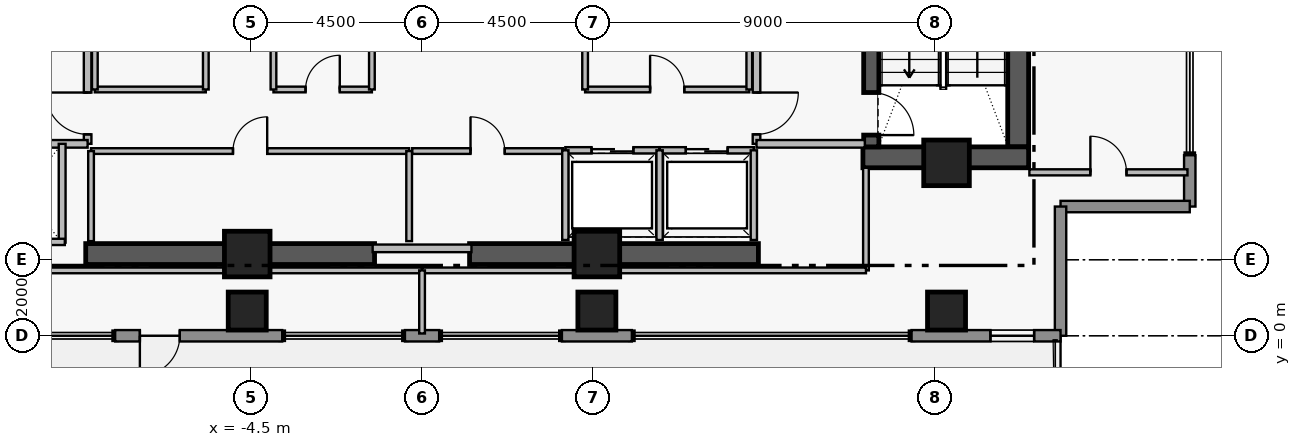
"""IFC4 building model, lengths in metres.
Left out: names, types, materials, properties, quantities, classifications, styles, units other than length and angle.
Written with IfcOpenShell. Run it as: python <this file> out.ifc"""

import sys

from ifc_helpers import new_model, si_unit, direction, frame, frame_2d, origin, origin_2d, place, context, subcontext, project, spatial, rectangle, extrude, element, fill, save


model = new_model("IFC4")
c1 = context("Model", 3, precision=1e-05, world=origin(), true_north=direction((0.0, 1.0)))
c2 = subcontext(c1, "Body", "Model", "MODEL_VIEW")
j1 = project(units=[si_unit("LENGTHUNIT", "METRE"), si_unit("PLANEANGLEUNIT", "RADIAN")], contexts=[c1])
p1 = place(None, origin())
s1 = spatial("IfcSite", under=j1, at=p1, CompositionType="ELEMENT")
p2 = place(p1, origin())
s2 = spatial("IfcBuilding", under=s1, at=p2, CompositionType="ELEMENT")
p3 = place(p2, frame((0.0, 0.0, 272.95)))
s3 = spatial("IfcBuildingStorey", under=s2, at=p3, CompositionType="ELEMENT", Elevation=272.95)
p4 = place(p3, frame((15.685, 4.97, 0.0), z_axis=(0.0, 0.0, 1.0), x_axis=(0.0, 1.0, 0.0)))
e1 = element("IfcWall", 1, at=p4, inside=s3, PredefinedType="SHEAR", context=c2, shape_type="SweptSolid", body=[
    extrude(rectangle(XDim=8.96, YDim=0.55, at=frame_2d((4.48, 0.0))), origin(), (0.0, 0.0, 1.0), 3.51),
])
p5 = place(p3, frame((11.6, 4.695, 0.0), z_axis=(0.0, 0.0, 1.0), x_axis=(1.0, 0.0, 0.0)))
e2 = element("IfcWall", 2, at=p5, inside=s3, PredefinedType="SHEAR", context=c2, shape_type="SweptSolid", body=[
    extrude(rectangle(XDim=4.36, YDim=0.55, at=frame_2d((2.18, 0.0))), origin(), (0.0, 0.0, 1.0), 3.51),
])
for number, where, z_axis, x_axis in (
    (3, (-8.85, 2.15, 0.0), (0.0, 0.0, 1.0), (1.0, 0.0, 0.0)),
    (4, (1.25, 2.15, 0.0), (0.0, 0.0, 1.0), (1.0, 0.0, 0.0)),
):
    element("IfcWall", number, at=place(p3, frame(where, z_axis=z_axis, x_axis=x_axis)), inside=s3, PredefinedType="SHEAR", context=c2, shape_type="SweptSolid", body=[
        extrude(rectangle(XDim=7.6, YDim=0.55, at=frame_2d((3.8, 0.0))), origin(), (0.0, 0.0, 1.0), 3.48),
    ])
p6 = place(p3, frame((11.82, 13.93, 0.0), z_axis=(0.0, 0.0, 1.0), x_axis=(0.0, -1.0, 0.0)))
e5 = element("IfcWall", 5, at=p6, inside=s3, PredefinedType="SHEAR", context=c2, shape_type="SweptSolid", body=[
    extrude(rectangle(XDim=8.96, YDim=0.4, at=frame_2d((4.48, 0.0))), origin(), (0.0, 0.0, 1.0), 3.51),
])
p7 = place(p6, frame((7.53, 0.0, 0.0)))
e6 = element("IfcOpeningElement", 6, at=p7, cuts=e5, PredefinedType="OPENING", context=c2, shape_type="SweptSolid", body=[
    extrude(rectangle(XDim=1.12, YDim=2.22, at=frame_2d((0.56, 1.11))), frame((0.0, 0.21, 0.0), z_axis=(0.0, -1.0, 0.0), x_axis=(1.0, 0.0, 0.0)), (0.0, 0.0, 1.0), 0.42),
])
for number, where, z_axis, x_axis in (
    (7, (-4.6, 2.15, 0.0), (0.0, 0.0, 1.0), (1.0, 0.0, 0.0)),
    (8, (4.6, 2.15, 0.0), (0.0, 0.0, 1.0), (1.0, 0.0, 0.0)),
    (9, (13.8, 4.55, 0.0), (0.0, 0.0, 1.0), (1.0, 0.0, 0.0)),
):
    element("IfcColumn", number, at=place(p3, frame(where, z_axis=z_axis, x_axis=x_axis)), inside=s3, PredefinedType="COLUMN", context=c2, shape_type="SweptSolid", body=[
        extrude(rectangle(XDim=1.2, YDim=1.2, at=origin_2d()), origin(), (0.0, 0.0, 1.0), 3.7),
    ])
for number, where, z_axis, x_axis in (
    (10, (-4.6, 0.65, 0.0), (0.0, 0.0, 1.0), (1.0, 0.0, 0.0)),
    (11, (4.6, 0.65, 0.0), (0.0, 0.0, 1.0), (1.0, 0.0, 0.0)),
    (12, (13.8, 0.65, 0.0), (0.0, 0.0, 1.0), (1.0, 0.0, 0.0)),
):
    element("IfcColumn", number, at=place(p3, frame(where, z_axis=z_axis, x_axis=x_axis)), inside=s3, PredefinedType="COLUMN", context=c2, shape_type="SweptSolid", body=[
        extrude(rectangle(XDim=1.0, YDim=1.0, at=origin_2d()), origin(), (0.0, 0.0, 1.0), 3.7),
    ])
p8 = place(p3, frame((20.2, 4.75, 0.0), z_axis=(0.0, 0.0, 1.0), x_axis=(0.0, -1.0, 0.0)))
e13 = element("IfcWall", 13, at=p8, inside=s3, PredefinedType="STANDARD", context=c2, shape_type="SweptSolid", body=[
    extrude(rectangle(XDim=1.35, YDim=0.3, at=frame_2d((0.675, 0.0))), origin(), (0.0, 0.0, 1.0), 3.48),
])
for number, where, z_axis, x_axis in (
    (14, (20.2, 3.4, 0.0), (0.0, 0.0, 1.0), (-1.0, 0.0, 0.0)),
    (15, (16.8, 3.4, 0.0), (0.0, 0.0, 1.0), (0.0, -1.0, 0.0)),
):
    element("IfcWall", number, at=place(p3, frame(where, z_axis=z_axis, x_axis=x_axis)), inside=s3, PredefinedType="STANDARD", context=c2, shape_type="SweptSolid", body=[
        extrude(rectangle(XDim=3.4, YDim=0.3, at=frame_2d((1.7, 0.0))), origin(), (0.0, 0.0, 1.0), 3.48),
    ])
p9 = place(p3, frame((16.8, 0.0, 0.0), z_axis=(0.0, 0.0, 1.0), x_axis=(-1.0, 0.0, 0.0)))
e16 = element("IfcWall", 16, at=p9, inside=s3, PredefinedType="STANDARD", context=c2, shape_type="SweptSolid", body=[
    extrude(rectangle(XDim=3.92, YDim=0.3, at=frame_2d((1.96, 0.0))), origin(), (0.0, 0.0, 1.0), 3.48),
])
p10 = place(p9, frame((0.695, 0.0, 0.95)))
e17 = element("IfcOpeningElement", 17, at=p10, cuts=e16, PredefinedType="OPENING", context=c2, shape_type="SweptSolid", body=[
    extrude(rectangle(XDim=1.15, YDim=1.55, at=frame_2d((0.575, 0.775))), frame((0.0, 0.16, 0.0), z_axis=(0.0, -1.0, 0.0), x_axis=(1.0, 0.0, 0.0)), (0.0, 0.0, 1.0), 0.32),
])
p11 = place(p3, frame((5.52, 0.0, 0.0), z_axis=(0.0, 0.0, 1.0), x_axis=(-1.0, 0.0, 0.0)))
e18 = element("IfcWall", 18, at=p11, inside=s3, PredefinedType="STANDARD", context=c2, shape_type="SweptSolid", body=[
    extrude(rectangle(XDim=1.84, YDim=0.3, at=frame_2d((0.92, 0.0))), origin(), (0.0, 0.0, 1.0), 3.48),
])
p12 = place(p3, frame((0.45, 0.0, 0.0), z_axis=(0.0, 0.0, 1.0), x_axis=(-1.0, 0.0, 0.0)))
e19 = element("IfcWall", 19, at=p12, inside=s3, PredefinedType="STANDARD", context=c2, shape_type="SweptSolid", body=[
    extrude(rectangle(XDim=0.9, YDim=0.3, at=frame_2d((0.45, 0.0))), origin(), (0.0, 0.0, 1.0), 3.48),
])
p13 = place(p3, frame((-3.68, 0.0, 0.0), z_axis=(0.0, 0.0, 1.0), x_axis=(-1.0, 0.0, 0.0)))
e20 = element("IfcWall", 20, at=p13, inside=s3, PredefinedType="STANDARD", context=c2, shape_type="SweptSolid", body=[
    extrude(rectangle(XDim=4.395, YDim=0.3, at=frame_2d((2.198, 0.0))), origin(), (0.0, 0.0, 1.0), 3.48),
])
p14 = place(p13, frame((2.695, 0.0, 0.0)))
e21 = element("IfcOpeningElement", 21, at=p14, cuts=e20, PredefinedType="OPENING", context=c2, shape_type="SweptSolid", body=[
    extrude(rectangle(XDim=1.05, YDim=2.2, at=frame_2d((0.525, 1.1))), frame((0.0, 0.16, 0.0), z_axis=(0.0, -1.0, 0.0), x_axis=(1.0, 0.0, 0.0)), (0.0, 0.0, 1.0), 0.32),
])
p15 = place(p3, frame((-8.8, 5.05, 0.0), z_axis=(0.0, 0.0, 1.0), x_axis=(0.0, 1.0, 0.0)))
e22 = element("IfcWall", 22, at=p15, inside=s3, PredefinedType="PARTITIONING", context=c2, shape_type="SweptSolid", body=[
    extrude(rectangle(XDim=6.1, YDim=0.2, at=frame_2d((3.05, 0.0))), origin(), (0.0, 0.0, 1.0), 3.48),
])
p16 = place(p15, frame((0.25, 0.0, 0.0)))
e23 = element("IfcOpeningElement", 23, at=p16, cuts=e22, PredefinedType="OPENING", context=c2, shape_type="SweptSolid", body=[
    extrude(rectangle(XDim=1.1, YDim=2.2, at=frame_2d((0.55, 1.1))), frame((0.0, 0.11, 0.0), z_axis=(0.0, -1.0, 0.0), x_axis=(1.0, 0.0, 0.0)), (0.0, 0.0, 1.0), 0.22),
])
p17 = place(p15, frame((3.85, 0.0, 0.0)))
e24 = element("IfcOpeningElement", 24, at=p17, cuts=e22, PredefinedType="OPENING", context=c2, shape_type="SweptSolid", body=[
    extrude(rectangle(XDim=1.1, YDim=2.2, at=frame_2d((0.55, 1.1))), frame((0.0, 0.11, 0.0), z_axis=(0.0, -1.0, 0.0), x_axis=(1.0, 0.0, 0.0)), (0.0, 0.0, 1.0), 0.22),
])
p18 = place(p3, frame((8.8, 11.15, 0.0), z_axis=(0.0, 0.0, 1.0), x_axis=(0.0, -1.0, 0.0)))
e25 = element("IfcWall", 25, at=p18, inside=s3, PredefinedType="PARTITIONING", context=c2, shape_type="SweptSolid", body=[
    extrude(rectangle(XDim=6.1, YDim=0.2, at=frame_2d((3.05, 0.0))), origin(), (0.0, 0.0, 1.0), 3.48),
])
p19 = place(p18, frame((1.15, 0.0, 0.0)))
e26 = element("IfcOpeningElement", 26, at=p19, cuts=e25, PredefinedType="OPENING", context=c2, shape_type="SweptSolid", body=[
    extrude(rectangle(XDim=1.1, YDim=2.2, at=frame_2d((0.55, 1.1))), frame((0.0, 0.11, 0.0), z_axis=(0.0, -1.0, 0.0), x_axis=(1.0, 0.0, 0.0)), (0.0, 0.0, 1.0), 0.22),
])
p20 = place(p18, frame((4.75, 0.0, 0.0)))
e27 = element("IfcOpeningElement", 27, at=p20, cuts=e25, PredefinedType="OPENING", context=c2, shape_type="SweptSolid", body=[
    extrude(rectangle(XDim=1.1, YDim=2.2, at=frame_2d((0.55, 1.1))), frame((0.0, 0.11, 0.0), z_axis=(0.0, -1.0, 0.0), x_axis=(1.0, 0.0, 0.0)), (0.0, 0.0, 1.0), 0.22),
])
p21 = place(p3, frame((3.77, 4.88, 0.0), z_axis=(0.0, 0.0, 1.0), x_axis=(1.0, 0.0, 0.0)))
e28 = element("IfcWall", 28, at=p21, inside=s3, PredefinedType="PARTITIONING", context=c2, shape_type="SweptSolid", body=[
    extrude(rectangle(XDim=2.48, YDim=0.165, at=frame_2d((1.24, 0.0))), origin(), (0.0, 0.0, 1.0), 3.48),
])
p22 = place(p21, frame((0.69, 0.0, 0.0)))
e29 = element("IfcOpeningElement", 29, at=p22, cuts=e28, PredefinedType="OPENING", context=c2, shape_type="SweptSolid", body=[
    extrude(rectangle(XDim=1.1, YDim=2.25, at=frame_2d((0.55, 1.125))), frame((0.0, 0.093, 0.0), z_axis=(0.0, -1.0, 0.0), x_axis=(1.0, 0.0, 0.0)), (0.0, 0.0, 1.0), 0.185),
])
p23 = place(p3, frame((6.25, 4.88, 0.0), z_axis=(0.0, 0.0, 1.0), x_axis=(1.0, 0.0, 0.0)))
e30 = element("IfcWall", 30, at=p23, inside=s3, PredefinedType="PARTITIONING", context=c2, shape_type="SweptSolid", body=[
    extrude(rectangle(XDim=2.48, YDim=0.165, at=frame_2d((1.24, 0.0))), origin(), (0.0, 0.0, 1.0), 3.48),
])
p24 = place(p23, frame((0.69, 0.0, 0.0)))
e31 = element("IfcOpeningElement", 31, at=p24, cuts=e30, PredefinedType="OPENING", context=c2, shape_type="SweptSolid", body=[
    extrude(rectangle(XDim=1.1, YDim=2.25, at=frame_2d((0.55, 1.125))), frame((0.0, 0.093, 0.0), z_axis=(0.0, -1.0, 0.0), x_axis=(1.0, 0.0, 0.0)), (0.0, 0.0, 1.0), 0.185),
])
p25 = place(p3, frame((-8.71, 4.86, 0.0), z_axis=(0.0, 0.0, 1.0), x_axis=(1.0, 0.0, 0.0)))
e32 = element("IfcWall", 32, at=p25, inside=s3, PredefinedType="PARTITIONING", context=c2, shape_type="SweptSolid", body=[
    extrude(rectangle(XDim=8.37, YDim=0.15, at=frame_2d((4.185, 0.0))), origin(), (0.0, 0.0, 1.0), 3.48),
])
p26 = place(p25, frame((3.735, 0.0, 0.0)))
e33 = element("IfcOpeningElement", 33, at=p26, cuts=e32, PredefinedType="OPENING", context=c2, shape_type="SweptSolid", body=[
    extrude(rectangle(XDim=0.9, YDim=2.15, at=frame_2d((0.45, 1.075))), frame((0.0, 0.085, 0.0), z_axis=(0.0, -1.0, 0.0), x_axis=(1.0, 0.0, 0.0)), (0.0, 0.0, 1.0), 0.17),
])
p27 = place(p3, frame((-0.26, 4.86, 0.0), z_axis=(0.0, 0.0, 1.0), x_axis=(1.0, 0.0, 0.0)))
e34 = element("IfcWall", 34, at=p27, inside=s3, PredefinedType="PARTITIONING", context=c2, shape_type="SweptSolid", body=[
    extrude(rectangle(XDim=3.97, YDim=0.15, at=frame_2d((1.985, 0.0))), origin(), (0.0, 0.0, 1.0), 3.48),
])
p28 = place(p27, frame((1.535, 0.0, 0.0)))
e35 = element("IfcOpeningElement", 35, at=p28, cuts=e34, PredefinedType="OPENING", context=c2, shape_type="SweptSolid", body=[
    extrude(rectangle(XDim=0.9, YDim=2.15, at=frame_2d((0.45, 1.075))), frame((0.0, 0.085, 0.0), z_axis=(0.0, -1.0, 0.0), x_axis=(1.0, 0.0, 0.0)), (0.0, 0.0, 1.0), 0.17),
])
p29 = place(p3, frame((-3.91, 6.48, 0.0), z_axis=(0.0, 0.0, 1.0), x_axis=(1.0, 0.0, 0.0)))
e36 = element("IfcWall", 36, at=p29, inside=s3, PredefinedType="PARTITIONING", context=c2, shape_type="SweptSolid", body=[
    extrude(rectangle(XDim=2.59, YDim=0.15, at=frame_2d((1.295, 0.0))), origin(), (0.0, 0.0, 1.0), 3.48),
])
p30 = place(p29, frame((0.845, 0.0, 0.0)))
e37 = element("IfcOpeningElement", 37, at=p30, cuts=e36, PredefinedType="OPENING", context=c2, shape_type="SweptSolid", body=[
    extrude(rectangle(XDim=0.9, YDim=2.15, at=frame_2d((0.45, 1.075))), frame((0.0, 0.085, 0.0), z_axis=(0.0, -1.0, 0.0), x_axis=(1.0, 0.0, 0.0)), (0.0, 0.0, 1.0), 0.17),
])
p31 = place(p3, frame((4.29, 6.48, 0.0), z_axis=(0.0, 0.0, 1.0), x_axis=(1.0, 0.0, 0.0)))
e38 = element("IfcWall", 38, at=p31, inside=s3, PredefinedType="PARTITIONING", context=c2, shape_type="SweptSolid", body=[
    extrude(rectangle(XDim=4.32, YDim=0.15, at=frame_2d((2.16, 0.0))), origin(), (0.0, 0.0, 1.0), 3.48),
])
p32 = place(p31, frame((1.71, 0.0, 0.0)))
e39 = element("IfcOpeningElement", 39, at=p32, cuts=e38, PredefinedType="OPENING", context=c2, shape_type="SweptSolid", body=[
    extrude(rectangle(XDim=0.9, YDim=2.15, at=frame_2d((0.45, 1.075))), frame((0.0, 0.085, 0.0), z_axis=(0.0, -1.0, 0.0), x_axis=(1.0, 0.0, 0.0)), (0.0, 0.0, 1.0), 0.17),
])
p33 = place(p3, frame((15.98, 4.3, 0.0), z_axis=(0.0, 0.0, 1.0), x_axis=(1.0, 0.0, 0.0)))
e40 = element("IfcWall", 40, at=p33, inside=s3, PredefinedType="PARTITIONING", context=c2, shape_type="SweptSolid", body=[
    extrude(rectangle(XDim=4.16, YDim=0.16, at=frame_2d((2.08, 0.0))), origin(), (0.0, 0.0, 1.0), 3.48),
])
p34 = place(p33, frame((1.605, 0.0, 0.0)))
e41 = element("IfcOpeningElement", 41, at=p34, cuts=e40, PredefinedType="OPENING", context=c2, shape_type="SweptSolid", body=[
    extrude(rectangle(XDim=0.95, YDim=2.15, at=frame_2d((0.475, 1.075))), frame((0.0, 0.09, 0.0), z_axis=(0.0, -1.0, 0.0), x_axis=(1.0, 0.0, 0.0)), (0.0, 0.0, 1.0), 0.18),
])
for number, where, z_axis, x_axis in (
    (42, (-11.65, 5.05, 0.0), (0.0, 0.0, 1.0), (1.0, 0.0, 0.0)),
    (43, (8.8, 5.05, 0.0), (0.0, 0.0, 1.0), (1.0, 0.0, 0.0)),
):
    element("IfcWall", number, at=place(p3, frame(where, z_axis=z_axis, x_axis=x_axis)), inside=s3, PredefinedType="PARTITIONING", context=c2, shape_type="SweptSolid", body=[
        extrude(rectangle(XDim=2.85, YDim=0.2, at=frame_2d((1.425, 0.0))), origin(), (0.0, 0.0, 1.0), 3.48),
    ])
for number, where, z_axis, x_axis in (
    (44, (3.77, 2.52, 0.0), (0.0, 0.0, 1.0), (0.0, 1.0, 0.0)),
    (45, (6.25, 2.52, 0.0), (0.0, 0.0, 1.0), (0.0, 1.0, 0.0)),
    (46, (8.73, 2.52, 0.0), (0.0, 0.0, 1.0), (0.0, 1.0, 0.0)),
):
    element("IfcWall", number, at=place(p3, frame(where, z_axis=z_axis, x_axis=x_axis)), inside=s3, PredefinedType="PARTITIONING", context=c2, shape_type="SweptSolid", body=[
        extrude(rectangle(XDim=2.36, YDim=0.165, at=frame_2d((1.18, 0.0))), origin(), (0.0, 0.0, 1.0), 3.48),
    ])
p35 = place(p3, frame((-1.3, 2.3, 0.0), z_axis=(0.0, 0.0, 1.0), x_axis=(1.0, 0.0, 0.0)))
e47 = element("IfcWall", 47, at=p35, inside=s3, PredefinedType="PARTITIONING", context=c2, shape_type="SweptSolid", body=[
    extrude(rectangle(XDim=2.6, YDim=0.2, at=frame_2d((1.3, 0.0))), origin(), (0.0, 0.0, 1.0), 2.38),
])
for number, where, z_axis, x_axis in (
    (48, (-8.71, 2.49, 0.0), (0.0, 0.0, 1.0), (0.0, 1.0, 0.0)),
    (49, (-0.34, 2.49, 0.0), (0.0, 0.0, 1.0), (0.0, 1.0, 0.0)),
):
    element("IfcWall", number, at=place(p3, frame(where, z_axis=z_axis, x_axis=x_axis)), inside=s3, PredefinedType="PARTITIONING", context=c2, shape_type="SweptSolid", body=[
        extrude(rectangle(XDim=2.37, YDim=0.15, at=frame_2d((1.185, 0.0))), origin(), (0.0, 0.0, 1.0), 3.48),
    ])
p36 = place(p3, frame((-9.47, 2.45, 0.0), z_axis=(0.0, 0.0, 1.0), x_axis=(0.0, 1.0, 0.0)))
e50 = element("IfcWall", 50, at=p36, inside=s3, PredefinedType="PARTITIONING", context=c2, shape_type="SweptSolid", body=[
    extrude(rectangle(XDim=2.6, YDim=0.18, at=frame_2d((1.3, 0.0))), origin(), (0.0, 0.0, 1.0), 3.48),
])
p37 = place(p3, frame((-11.71, 2.47, 0.0), z_axis=(0.0, 0.0, 1.0), x_axis=(1.0, 0.0, 0.0)))
e51 = element("IfcWall", 51, at=p37, inside=s3, PredefinedType="PARTITIONING", context=c2, shape_type="SweptSolid", body=[
    extrude(rectangle(XDim=2.31, YDim=0.165, at=frame_2d((1.155, 0.0))), origin(), (0.0, 0.0, 1.0), 2.38),
])
p38 = place(p3, frame((-8.61, 6.48, 0.0), z_axis=(0.0, 0.0, 1.0), x_axis=(1.0, 0.0, 0.0)))
e52 = element("IfcWall", 52, at=p38, inside=s3, PredefinedType="PARTITIONING", context=c2, shape_type="SweptSolid", body=[
    extrude(rectangle(XDim=2.92, YDim=0.15, at=frame_2d((1.46, 0.0))), origin(), (0.0, 0.0, 1.0), 3.48),
])
for number, where, z_axis, x_axis in (
    (53, (-8.61, 6.48, 0.0), (0.0, 0.0, 1.0), (0.0, 1.0, 0.0)),
    (54, (-5.69, 6.48, 0.0), (0.0, 0.0, 1.0), (0.0, 1.0, 0.0)),
    (55, (-3.91, 6.48, 0.0), (0.0, 0.0, 1.0), (0.0, 1.0, 0.0)),
    (56, (-1.32, 6.48, 0.0), (0.0, 0.0, 1.0), (0.0, 1.0, 0.0)),
    (57, (4.29, 6.48, 0.0), (0.0, 0.0, 1.0), (0.0, 1.0, 0.0)),
    (58, (8.61, 6.48, 0.0), (0.0, 0.0, 1.0), (0.0, 1.0, 0.0)),
):
    element("IfcWall", number, at=place(p3, frame(where, z_axis=z_axis, x_axis=x_axis)), inside=s3, PredefinedType="PARTITIONING", context=c2, shape_type="SweptSolid", body=[
        extrude(rectangle(XDim=2.24, YDim=0.15, at=frame_2d((1.12, 0.0))), origin(), (0.0, 0.0, 1.0), 3.48),
    ])
p39 = place(p3, frame((-11.68, 1.72, 0.0), z_axis=(0.0, 0.0, 1.0), x_axis=(1.0, 0.0, 0.0)))
e59 = element("IfcWall", 59, at=p39, inside=s3, PredefinedType="PARTITIONING", context=c2, shape_type="SweptSolid", body=[
    extrude(rectangle(XDim=11.68, YDim=0.15, at=frame_2d((5.84, 0.0))), origin(), (0.0, 0.0, 1.0), 2.38),
])
p40 = place(p3, frame((11.68, 1.72, 0.0), z_axis=(0.0, 0.0, 1.0), x_axis=(0.0, 1.0, 0.0)))
e60 = element("IfcWall", 60, at=p40, inside=s3, PredefinedType="PARTITIONING", context=c2, shape_type="SweptSolid", body=[
    extrude(rectangle(XDim=2.7, YDim=0.15, at=frame_2d((1.35, 0.0))), origin(), (0.0, 0.0, 1.0), 3.48),
])
p41 = place(p3, frame((0.0, 1.72, 0.0), z_axis=(0.0, 0.0, 1.0), x_axis=(1.0, 0.0, 0.0)))
e61 = element("IfcWall", 61, at=p41, inside=s3, PredefinedType="PARTITIONING", context=c2, shape_type="SweptSolid", body=[
    extrude(rectangle(XDim=11.68, YDim=0.15, at=frame_2d((5.84, 0.0))), origin(), (0.0, 0.0, 1.0), 2.38),
])
p42 = place(p3, frame((0.0, 0.06, 0.0), z_axis=(0.0, 0.0, 1.0), x_axis=(0.0, 1.0, 0.0)))
e62 = element("IfcWall", 62, at=p42, inside=s3, PredefinedType="PARTITIONING", context=c2, shape_type="SweptSolid", body=[
    extrude(rectangle(XDim=1.66, YDim=0.15, at=frame_2d((0.83, 0.0))), origin(), (0.0, 0.0, 1.0), 3.48),
])
p43 = place(p10, origin())
e63 = element("IfcWindow", 63, at=p43, inside=s3, PartitioningType="SINGLE_PANEL", PredefinedType="WINDOW", context=c2, shape_type="SweptSolid", body=[
    extrude(rectangle(XDim=1.15, YDim=1.55, at=frame_2d((0.575, 0.775))), frame((0.0, 0.03, 0.0), z_axis=(0.0, -1.0, 0.0), x_axis=(1.0, 0.0, 0.0)), (0.0, 0.0, 1.0), 0.06),
])
fill(e17, e63)
p44 = place(p14, origin())
e64 = element("IfcDoor", 64, at=p44, inside=s3, OperationType="SINGLE_SWING_RIGHT", PredefinedType="DOOR", context=c2, shape_type="SweptSolid", body=[
    extrude(rectangle(XDim=1.05, YDim=2.2, at=frame_2d((0.525, 1.1))), frame((0.0, 0.025, 0.0), z_axis=(0.0, -1.0, 0.0), x_axis=(1.0, 0.0, 0.0)), (0.0, 0.0, 1.0), 0.05),
])
fill(e21, e64)
p45 = place(p7, origin())
e65 = element("IfcDoor", 65, at=p45, inside=s3, OperationType="SINGLE_SWING_RIGHT", PredefinedType="DOOR", context=c2, shape_type="SweptSolid", body=[
    extrude(rectangle(XDim=1.12, YDim=2.22, at=frame_2d((0.56, 1.11))), frame((0.0, 0.025, 0.0), z_axis=(0.0, -1.0, 0.0), x_axis=(1.0, 0.0, 0.0)), (0.0, 0.0, 1.0), 0.05),
])
fill(e6, e65)
p46 = place(p16, origin())
e66 = element("IfcDoor", 66, at=p46, inside=s3, OperationType="SINGLE_SWING_RIGHT", PredefinedType="DOOR", context=c2, shape_type="SweptSolid", body=[
    extrude(rectangle(XDim=1.1, YDim=2.2, at=frame_2d((0.55, 1.1))), frame((0.0, 0.025, 0.0), z_axis=(0.0, -1.0, 0.0), x_axis=(1.0, 0.0, 0.0)), (0.0, 0.0, 1.0), 0.05),
])
fill(e23, e66)
p47 = place(p20, origin())
e67 = element("IfcDoor", 67, at=p47, inside=s3, OperationType="SINGLE_SWING_LEFT", PredefinedType="DOOR", context=c2, shape_type="SweptSolid", body=[
    extrude(rectangle(XDim=1.1, YDim=2.2, at=frame_2d((0.55, 1.1))), frame((0.0, 0.025, 0.0), z_axis=(0.0, -1.0, 0.0), x_axis=(1.0, 0.0, 0.0)), (0.0, 0.0, 1.0), 0.05),
])
fill(e27, e67)
p48 = place(p22, origin())
e68 = element("IfcDoor", 68, at=p48, inside=s3, OperationType="SLIDING_TO_LEFT", PredefinedType="DOOR", context=c2, shape_type="SweptSolid", body=[
    extrude(rectangle(XDim=1.1, YDim=2.25, at=frame_2d((0.55, 1.125))), frame((0.0, 0.025, 0.0), z_axis=(0.0, -1.0, 0.0), x_axis=(1.0, 0.0, 0.0)), (0.0, 0.0, 1.0), 0.05),
])
fill(e29, e68)
p49 = place(p24, origin())
e69 = element("IfcDoor", 69, at=p49, inside=s3, OperationType="SLIDING_TO_LEFT", PredefinedType="DOOR", context=c2, shape_type="SweptSolid", body=[
    extrude(rectangle(XDim=1.1, YDim=2.25, at=frame_2d((0.55, 1.125))), frame((0.0, 0.025, 0.0), z_axis=(0.0, -1.0, 0.0), x_axis=(1.0, 0.0, 0.0)), (0.0, 0.0, 1.0), 0.05),
])
fill(e31, e69)
p50 = place(p26, origin())
e70 = element("IfcDoor", 70, at=p50, inside=s3, OperationType="SINGLE_SWING_RIGHT", PredefinedType="DOOR", context=c2, shape_type="SweptSolid", body=[
    extrude(rectangle(XDim=0.9, YDim=2.15, at=frame_2d((0.45, 1.075))), frame((0.0, 0.025, 0.0), z_axis=(0.0, -1.0, 0.0), x_axis=(1.0, 0.0, 0.0)), (0.0, 0.0, 1.0), 0.05),
])
fill(e33, e70)
p51 = place(p28, origin())
e71 = element("IfcDoor", 71, at=p51, inside=s3, OperationType="SINGLE_SWING_LEFT", PredefinedType="DOOR", context=c2, shape_type="SweptSolid", body=[
    extrude(rectangle(XDim=0.9, YDim=2.15, at=frame_2d((0.45, 1.075))), frame((0.0, 0.025, 0.0), z_axis=(0.0, -1.0, 0.0), x_axis=(1.0, 0.0, 0.0)), (0.0, 0.0, 1.0), 0.05),
])
fill(e35, e71)
p52 = place(p30, origin())
e72 = element("IfcDoor", 72, at=p52, inside=s3, OperationType="SINGLE_SWING_RIGHT", PredefinedType="DOOR", context=c2, shape_type="SweptSolid", body=[
    extrude(rectangle(XDim=0.9, YDim=2.15, at=frame_2d((0.45, 1.075))), frame((0.0, 0.025, 0.0), z_axis=(0.0, -1.0, 0.0), x_axis=(1.0, 0.0, 0.0)), (0.0, 0.0, 1.0), 0.05),
])
fill(e37, e72)
p53 = place(p32, origin())
e73 = element("IfcDoor", 73, at=p53, inside=s3, OperationType="SINGLE_SWING_LEFT", PredefinedType="DOOR", context=c2, shape_type="SweptSolid", body=[
    extrude(rectangle(XDim=0.9, YDim=2.15, at=frame_2d((0.45, 1.075))), frame((0.0, 0.025, 0.0), z_axis=(0.0, -1.0, 0.0), x_axis=(1.0, 0.0, 0.0)), (0.0, 0.0, 1.0), 0.05),
])
fill(e39, e73)
p54 = place(p34, origin())
e74 = element("IfcDoor", 74, at=p54, inside=s3, OperationType="SINGLE_SWING_LEFT", PredefinedType="DOOR", context=c2, shape_type="SweptSolid", body=[
    extrude(rectangle(XDim=0.95, YDim=2.15, at=frame_2d((0.475, 1.075))), frame((0.0, 0.025, 0.0), z_axis=(0.0, -1.0, 0.0), x_axis=(1.0, 0.0, 0.0)), (0.0, 0.0, 1.0), 0.05),
])
fill(e41, e74)
save(model, sys.argv[1])
